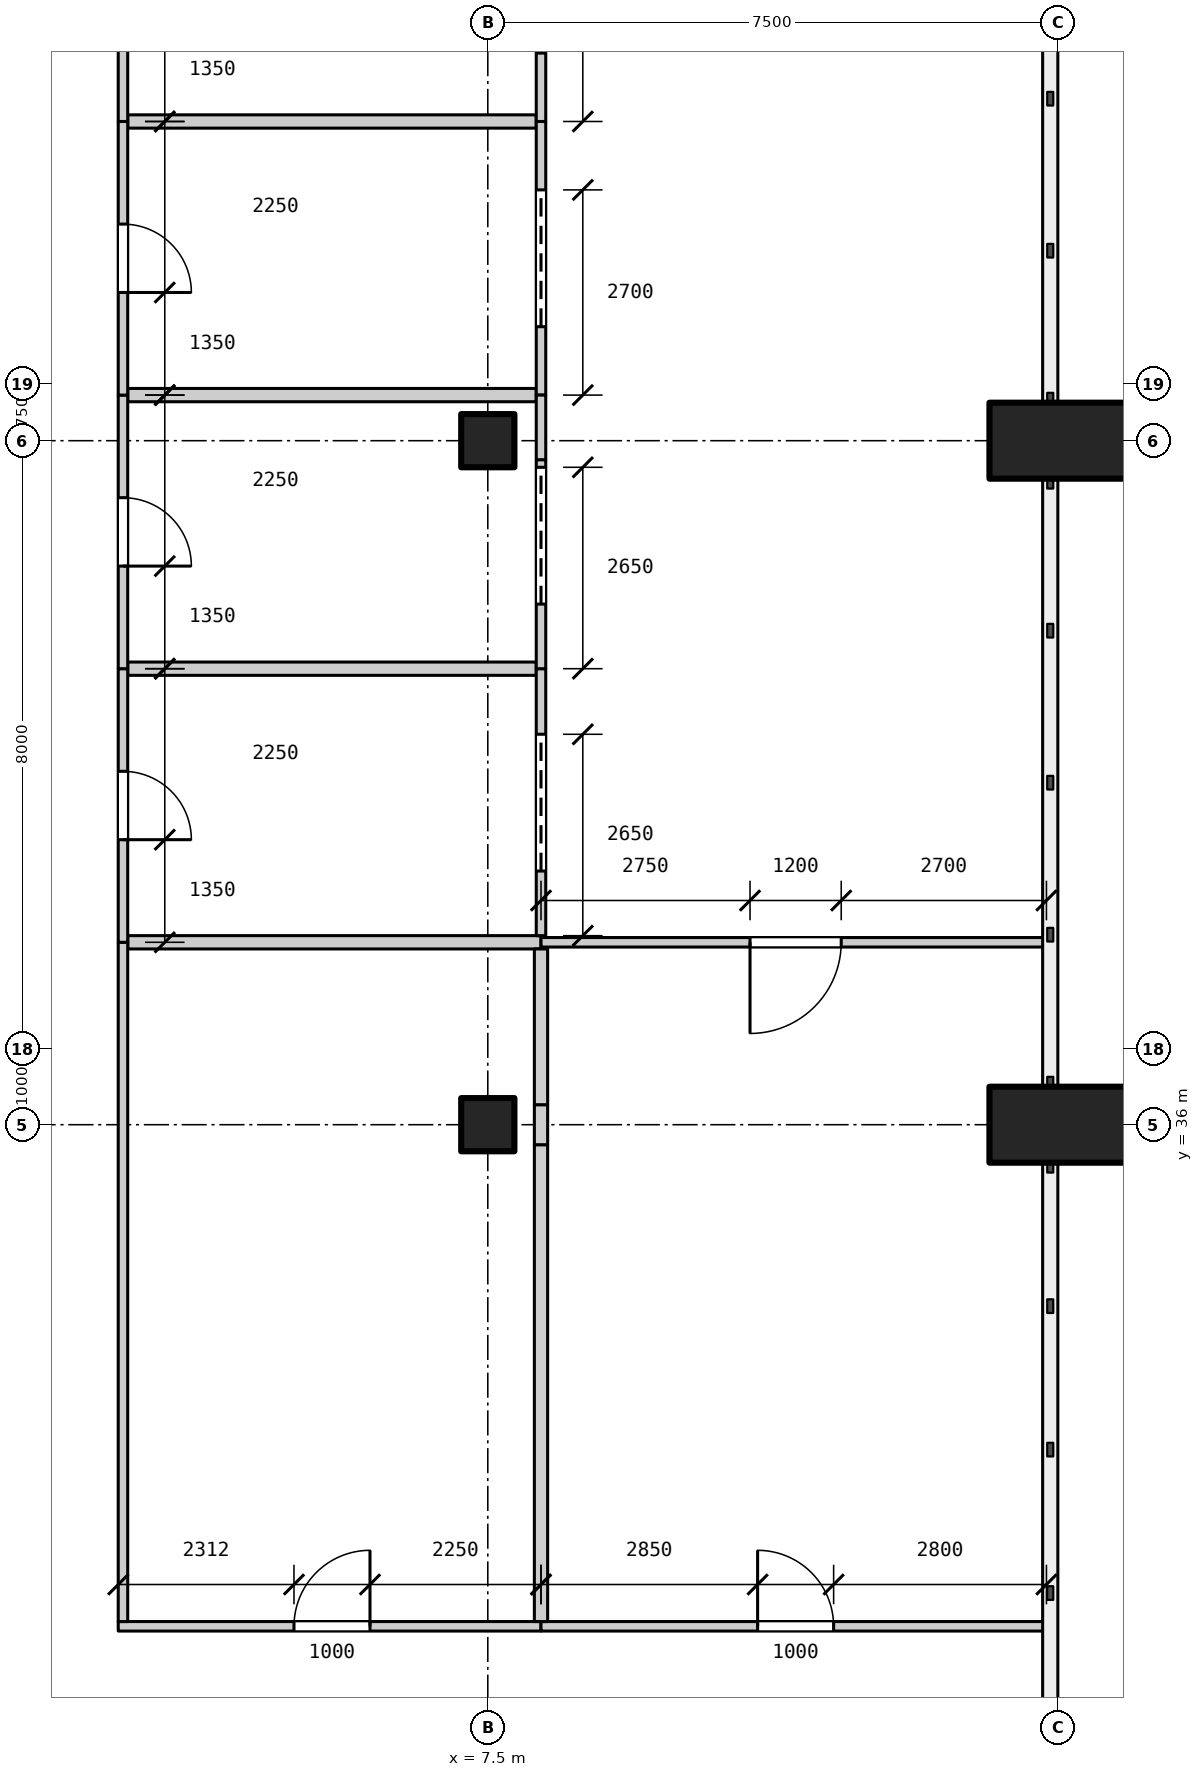
"""IFC4 building model, lengths in metres.
Left out: names, types, materials, properties, quantities, classifications, styles, units other than length and angle.
Written with IfcOpenShell. Run it as: python <this file> out.ifc"""

import sys

from ifc_helpers import new_model, si_unit, direction, frame, frame_2d, origin, origin_2d, place, context, subcontext, project, spatial, rectangle, extrude, element, fill, save


model = new_model("IFC4")
c1 = context("Model", 3, precision=1e-05, world=origin(), true_north=direction((0.0, 1.0)))
c2 = subcontext(c1, "Body", "Model", "MODEL_VIEW")
j1 = project(units=[si_unit("LENGTHUNIT", "METRE"), si_unit("PLANEANGLEUNIT", "RADIAN")], contexts=[c1])
p1 = place(None, origin())
s1 = spatial("IfcSite", under=j1, at=p1, CompositionType="ELEMENT")
p2 = place(p1, origin())
s2 = spatial("IfcBuilding", under=s1, at=p2, CompositionType="ELEMENT")
p3 = place(p2, frame((0.0, 0.0, 6.0)))
s3 = spatial("IfcBuildingStorey", under=s2, at=p3, CompositionType="ELEMENT", Elevation=6.0)
for number, where, z_axis, x_axis in (
    (1, (7.5, 36.0, 0.0), (0.0, 0.0, 1.0), (1.0, 0.0, 0.0)),
    (2, (7.5, 45.0, 0.0), (0.0, 0.0, 1.0), (1.0, 0.0, 0.0)),
):
    element("IfcColumn", number, at=place(p3, frame(where, z_axis=z_axis, x_axis=x_axis)), inside=s3, PredefinedType="COLUMN", context=c2, shape_type="SweptSolid", body=[
        extrude(rectangle(XDim=0.7, YDim=0.7, at=origin_2d()), origin(), (0.0, 0.0, 1.0), 3.9),
    ])
for number, where, z_axis, x_axis in (
    (3, (15.0, 36.0, 0.0), (0.0, 0.0, 1.0), (1.0, 0.0, 0.0)),
    (4, (15.0, 45.0, 0.0), (0.0, 0.0, 1.0), (1.0, 0.0, 0.0)),
):
    element("IfcColumn", number, at=place(p3, frame(where, z_axis=z_axis, x_axis=x_axis)), inside=s3, PredefinedType="COLUMN", context=c2, shape_type="SweptSolid", body=[
        extrude(rectangle(XDim=1.8, YDim=1.0, at=origin_2d()), origin(), (0.0, 0.0, 1.0), 4.2),
    ])
p4 = place(p3, frame((2.637, 29.4, 0.0), z_axis=(0.0, 0.0, 1.0), x_axis=(1.0, 0.0, 0.0)))
e5 = element("IfcWall", 5, at=p4, inside=s3, PredefinedType="PARTITIONING", context=c2, shape_type="SweptSolid", body=[
    extrude(rectangle(XDim=5.562, YDim=0.125, at=frame_2d((2.781, 0.0))), origin(), (0.0, 0.0, 1.0), 4.0),
])
p5 = place(p4, frame((2.312, 0.0, 0.0)))
e6 = element("IfcOpeningElement", 6, at=p5, cuts=e5, PredefinedType="OPENING", context=c2, shape_type="SweptSolid", body=[
    extrude(rectangle(XDim=1.0, YDim=2.1, at=frame_2d((0.5, 1.05))), frame((0.0, 0.073, 0.0), z_axis=(0.0, -1.0, 0.0), x_axis=(1.0, 0.0, 0.0)), (0.0, 0.0, 1.0), 0.145),
])
p6 = place(p3, frame((8.2, 29.4, 0.0), z_axis=(0.0, 0.0, 1.0), x_axis=(1.0, 0.0, 0.0)))
e7 = element("IfcWall", 7, at=p6, inside=s3, PredefinedType="PARTITIONING", context=c2, shape_type="SweptSolid", body=[
    extrude(rectangle(XDim=6.65, YDim=0.125, at=frame_2d((3.325, 0.0))), origin(), (0.0, 0.0, 1.0), 4.0),
])
p7 = place(p6, frame((2.85, 0.0, 0.0)))
e8 = element("IfcOpeningElement", 8, at=p7, cuts=e7, PredefinedType="OPENING", context=c2, shape_type="SweptSolid", body=[
    extrude(rectangle(XDim=1.0, YDim=2.1, at=frame_2d((0.5, 1.05))), frame((0.0, 0.073, 0.0), z_axis=(0.0, -1.0, 0.0), x_axis=(1.0, 0.0, 0.0)), (0.0, 0.0, 1.0), 0.145),
])
p8 = place(p3, frame((2.762, 38.4, 0.0), z_axis=(0.0, 0.0, 1.0), x_axis=(1.0, 0.0, 0.0)))
e9 = element("IfcWall", 9, at=p8, inside=s3, PredefinedType="PARTITIONING", context=c2, shape_type="SweptSolid", body=[
    extrude(rectangle(XDim=5.438, YDim=0.175, at=frame_2d((2.719, 0.0))), origin(), (0.0, 0.0, 1.0), 4.0),
])
p9 = place(p3, frame((8.2, 38.4, 0.0), z_axis=(0.0, 0.0, 1.0), x_axis=(1.0, 0.0, 0.0)))
e10 = element("IfcWall", 10, at=p9, inside=s3, PredefinedType="PARTITIONING", context=c2, shape_type="SweptSolid", body=[
    extrude(rectangle(XDim=6.65, YDim=0.125, at=frame_2d((3.325, 0.0))), origin(), (0.0, 0.0, 1.0), 4.0),
])
p10 = place(p9, frame((2.75, 0.0, 0.0)))
e11 = element("IfcOpeningElement", 11, at=p10, cuts=e10, PredefinedType="OPENING", context=c2, shape_type="SweptSolid", body=[
    extrude(rectangle(XDim=1.2, YDim=2.1, at=frame_2d((0.6, 1.05))), frame((0.0, 0.073, 0.0), z_axis=(0.0, -1.0, 0.0), x_axis=(1.0, 0.0, 0.0)), (0.0, 0.0, 1.0), 0.145),
])
for number, where, z_axis, x_axis in (
    (12, (2.762, 42.0, 0.0), (0.0, 0.0, 1.0), (1.0, 0.0, 0.0)),
    (13, (2.762, 45.6, 0.0), (0.0, 0.0, 1.0), (1.0, 0.0, 0.0)),
    (14, (2.762, 49.2, 0.0), (0.0, 0.0, 1.0), (1.0, 0.0, 0.0)),
):
    element("IfcWall", number, at=place(p3, frame(where, z_axis=z_axis, x_axis=x_axis)), inside=s3, PredefinedType="PARTITIONING", context=c2, shape_type="SweptSolid", body=[
        extrude(rectangle(XDim=5.375, YDim=0.175, at=frame_2d((2.688, 0.0))), origin(), (0.0, 0.0, 1.0), 4.0),
    ])
p11 = place(p3, frame((2.7, 29.462, 0.0), z_axis=(0.0, 0.0, 1.0), x_axis=(0.0, 1.0, 0.0)))
e15 = element("IfcWall", 15, at=p11, inside=s3, PredefinedType="PARTITIONING", context=c2, shape_type="SweptSolid", body=[
    extrude(rectangle(XDim=8.938, YDim=0.125, at=frame_2d((4.469, 0.0))), origin(), (0.0, 0.0, 1.0), 4.0),
])
p12 = place(p3, frame((2.7, 38.4, 0.0), z_axis=(0.0, 0.0, 1.0), x_axis=(0.0, 1.0, 0.0)))
e16 = element("IfcWall", 16, at=p12, inside=s3, PredefinedType="PARTITIONING", context=c2, shape_type="SweptSolid", body=[
    extrude(rectangle(XDim=3.6, YDim=0.125, at=frame_2d((1.8, 0.0))), origin(), (0.0, 0.0, 1.0), 4.0),
])
p13 = place(p12, frame((1.35, 0.0, 0.0)))
e17 = element("IfcOpeningElement", 17, at=p13, cuts=e16, PredefinedType="OPENING", context=c2, shape_type="SweptSolid", body=[
    extrude(rectangle(XDim=0.9, YDim=2.1, at=frame_2d((0.45, 1.05))), frame((0.0, 0.073, 0.0), z_axis=(0.0, -1.0, 0.0), x_axis=(1.0, 0.0, 0.0)), (0.0, 0.0, 1.0), 0.145),
])
p14 = place(p3, frame((2.7, 42.0, 0.0), z_axis=(0.0, 0.0, 1.0), x_axis=(0.0, 1.0, 0.0)))
e18 = element("IfcWall", 18, at=p14, inside=s3, PredefinedType="PARTITIONING", context=c2, shape_type="SweptSolid", body=[
    extrude(rectangle(XDim=3.6, YDim=0.125, at=frame_2d((1.8, 0.0))), origin(), (0.0, 0.0, 1.0), 4.0),
])
p15 = place(p14, frame((1.35, 0.0, 0.0)))
e19 = element("IfcOpeningElement", 19, at=p15, cuts=e18, PredefinedType="OPENING", context=c2, shape_type="SweptSolid", body=[
    extrude(rectangle(XDim=0.9, YDim=2.1, at=frame_2d((0.45, 1.05))), frame((0.0, 0.073, 0.0), z_axis=(0.0, -1.0, 0.0), x_axis=(1.0, 0.0, 0.0)), (0.0, 0.0, 1.0), 0.145),
])
p16 = place(p3, frame((2.7, 45.6, 0.0), z_axis=(0.0, 0.0, 1.0), x_axis=(0.0, 1.0, 0.0)))
e20 = element("IfcWall", 20, at=p16, inside=s3, PredefinedType="PARTITIONING", context=c2, shape_type="SweptSolid", body=[
    extrude(rectangle(XDim=3.6, YDim=0.125, at=frame_2d((1.8, 0.0))), origin(), (0.0, 0.0, 1.0), 4.0),
])
p17 = place(p16, frame((1.35, 0.0, 0.0)))
e21 = element("IfcOpeningElement", 21, at=p17, cuts=e20, PredefinedType="OPENING", context=c2, shape_type="SweptSolid", body=[
    extrude(rectangle(XDim=0.9, YDim=2.1, at=frame_2d((0.45, 1.05))), frame((0.0, 0.073, 0.0), z_axis=(0.0, -1.0, 0.0), x_axis=(1.0, 0.0, 0.0)), (0.0, 0.0, 1.0), 0.145),
])
p18 = place(p3, frame((2.7, 49.2, 0.0), z_axis=(0.0, 0.0, 1.0), x_axis=(0.0, 1.0, 0.0)))
e22 = element("IfcWall", 22, at=p18, inside=s3, PredefinedType="PARTITIONING", context=c2, shape_type="SweptSolid", body=[
    extrude(rectangle(XDim=3.6, YDim=0.125, at=frame_2d((1.8, 0.0))), origin(), (0.0, 0.0, 1.0), 4.0),
])
p19 = place(p18, frame((1.35, 0.0, 0.0)))
e23 = element("IfcOpeningElement", 23, at=p19, cuts=e22, PredefinedType="OPENING", context=c2, shape_type="SweptSolid", body=[
    extrude(rectangle(XDim=0.9, YDim=2.1, at=frame_2d((0.45, 1.05))), frame((0.0, 0.073, 0.0), z_axis=(0.0, -1.0, 0.0), x_axis=(1.0, 0.0, 0.0)), (0.0, 0.0, 1.0), 0.145),
])
p20 = place(p3, frame((8.2, 29.462, 0.0), z_axis=(0.0, 0.0, 1.0), x_axis=(0.0, 1.0, 0.0)))
e24 = element("IfcWall", 24, at=p20, inside=s3, PredefinedType="PARTITIONING", context=c2, shape_type="SweptSolid", body=[
    extrude(rectangle(XDim=6.274, YDim=0.175, at=frame_2d((3.137, 0.0))), origin(), (0.0, 0.0, 1.0), 3.567),
])
p21 = place(p3, frame((8.2, 38.488, 0.0), z_axis=(0.0, 0.0, 1.0), x_axis=(0.0, 1.0, 0.0)))
e25 = element("IfcWall", 25, at=p21, inside=s3, PredefinedType="PARTITIONING", context=c2, shape_type="SweptSolid", body=[
    extrude(rectangle(XDim=3.512, YDim=0.125, at=frame_2d((1.756, 0.0))), origin(), (0.0, 0.0, 1.0), 3.567),
])
p22 = place(p21, frame((0.85, 0.0, 0.0)))
e26 = element("IfcOpeningElement", 26, at=p22, cuts=e25, PredefinedType="OPENING", context=c2, shape_type="SweptSolid", body=[
    extrude(rectangle(XDim=1.8, YDim=2.4, at=frame_2d((0.9, 1.2))), frame((0.0, 0.073, 0.0), z_axis=(0.0, -1.0, 0.0), x_axis=(1.0, 0.0, 0.0)), (0.0, 0.0, 1.0), 0.145),
])
p23 = place(p3, frame((8.2, 42.0, 0.0), z_axis=(0.0, 0.0, 1.0), x_axis=(0.0, 1.0, 0.0)))
e27 = element("IfcWall", 27, at=p23, inside=s3, PredefinedType="PARTITIONING", context=c2, shape_type="SweptSolid", body=[
    extrude(rectangle(XDim=2.75, YDim=0.125, at=frame_2d((1.375, 0.0))), origin(), (0.0, 0.0, 1.0), 3.567),
])
p24 = place(p23, frame((0.85, 0.0, 0.0)))
e28 = element("IfcOpeningElement", 28, at=p24, cuts=e27, PredefinedType="OPENING", context=c2, shape_type="SweptSolid", body=[
    extrude(rectangle(XDim=1.8, YDim=2.4, at=frame_2d((0.9, 1.2))), frame((0.0, 0.073, 0.0), z_axis=(0.0, -1.0, 0.0), x_axis=(1.0, 0.0, 0.0)), (0.0, 0.0, 1.0), 0.145),
])
p25 = place(p3, frame((8.2, 45.6, 0.0), z_axis=(0.0, 0.0, 1.0), x_axis=(0.0, 1.0, 0.0)))
e29 = element("IfcWall", 29, at=p25, inside=s3, PredefinedType="PARTITIONING", context=c2, shape_type="SweptSolid", body=[
    extrude(rectangle(XDim=3.6, YDim=0.125, at=frame_2d((1.8, 0.0))), origin(), (0.0, 0.0, 1.0), 3.567),
])
p26 = place(p25, frame((0.9, 0.0, 0.0)))
e30 = element("IfcOpeningElement", 30, at=p26, cuts=e29, PredefinedType="OPENING", context=c2, shape_type="SweptSolid", body=[
    extrude(rectangle(XDim=1.8, YDim=2.4, at=frame_2d((0.9, 1.2))), frame((0.0, 0.073, 0.0), z_axis=(0.0, -1.0, 0.0), x_axis=(1.0, 0.0, 0.0)), (0.0, 0.0, 1.0), 0.145),
])
p27 = place(p3, frame((8.2, 49.2, 0.0), z_axis=(0.0, 0.0, 1.0), x_axis=(0.0, 1.0, 0.0)))
e31 = element("IfcWall", 31, at=p27, inside=s3, PredefinedType="PARTITIONING", context=c2, shape_type="SweptSolid", body=[
    extrude(rectangle(XDim=3.6, YDim=0.125, at=frame_2d((1.8, 0.0))), origin(), (0.0, 0.0, 1.0), 3.567),
])
p28 = place(p27, frame((0.9, 0.0, 0.0)))
e32 = element("IfcOpeningElement", 32, at=p28, cuts=e31, PredefinedType="OPENING", context=c2, shape_type="SweptSolid", body=[
    extrude(rectangle(XDim=1.8, YDim=2.4, at=frame_2d((0.9, 1.2))), frame((0.0, 0.073, 0.0), z_axis=(0.0, -1.0, 0.0), x_axis=(1.0, 0.0, 0.0)), (0.0, 0.0, 1.0), 0.145),
])
p29 = place(p3, frame((8.2, 35.737, 0.0), z_axis=(0.0, 0.0, 1.0), x_axis=(0.0, 1.0, 0.0)))
e33 = element("IfcWall", 33, at=p29, inside=s3, PredefinedType="PARTITIONING", context=c2, shape_type="SweptSolid", body=[
    extrude(rectangle(XDim=0.526, YDim=0.175, at=frame_2d((0.263, 0.0))), origin(), (0.0, 0.0, 1.0), 4.0),
])
p30 = place(p3, frame((8.2, 36.263, 0.0), z_axis=(0.0, 0.0, 1.0), x_axis=(0.0, 1.0, 0.0)))
e34 = element("IfcWall", 34, at=p30, inside=s3, PredefinedType="PARTITIONING", context=c2, shape_type="SweptSolid", body=[
    extrude(rectangle(XDim=2.049, YDim=0.175, at=frame_2d((1.025, 0.0))), origin(), (0.0, 0.0, 1.0), 3.567),
])
p31 = place(p3, frame((8.2, 44.75, 0.0), z_axis=(0.0, 0.0, 1.0), x_axis=(0.0, 1.0, 0.0)))
e35 = element("IfcWall", 35, at=p31, inside=s3, PredefinedType="PARTITIONING", context=c2, shape_type="SweptSolid", body=[
    extrude(rectangle(XDim=0.85, YDim=0.125, at=frame_2d((0.425, 0.0))), origin(), (0.0, 0.0, 1.0), 4.0),
])
p32 = place(p5, origin())
e36 = element("IfcDoor", 36, at=p32, inside=s3, OperationType="SINGLE_SWING_RIGHT", PredefinedType="DOOR", context=c2, shape_type="SweptSolid", body=[
    extrude(rectangle(XDim=1.0, YDim=2.1, at=frame_2d((0.5, 1.05))), frame((0.0, 0.025, 0.0), z_axis=(0.0, -1.0, 0.0), x_axis=(1.0, 0.0, 0.0)), (0.0, 0.0, 1.0), 0.05),
])
fill(e6, e36)
p33 = place(p7, origin())
e37 = element("IfcDoor", 37, at=p33, inside=s3, OperationType="SINGLE_SWING_LEFT", PredefinedType="DOOR", context=c2, shape_type="SweptSolid", body=[
    extrude(rectangle(XDim=1.0, YDim=2.1, at=frame_2d((0.5, 1.05))), frame((0.0, 0.025, 0.0), z_axis=(0.0, -1.0, 0.0), x_axis=(1.0, 0.0, 0.0)), (0.0, 0.0, 1.0), 0.05),
])
fill(e8, e37)
p34 = place(p10, frame((1.2, 0.0, 0.0), z_axis=(0.0, 0.0, 1.0), x_axis=(-1.0, 0.0, 0.0)))
e38 = element("IfcDoor", 38, at=p34, inside=s3, OperationType="SINGLE_SWING_RIGHT", PredefinedType="DOOR", context=c2, shape_type="SweptSolid", body=[
    extrude(rectangle(XDim=1.2, YDim=2.1, at=frame_2d((0.6, 1.05))), frame((0.0, 0.025, 0.0), z_axis=(0.0, -1.0, 0.0), x_axis=(1.0, 0.0, 0.0)), (0.0, 0.0, 1.0), 0.05),
])
fill(e11, e38)
p35 = place(p13, frame((0.9, 0.0, 0.0), z_axis=(0.0, 0.0, 1.0), x_axis=(-1.0, 0.0, 0.0)))
e39 = element("IfcDoor", 39, at=p35, inside=s3, OperationType="SINGLE_SWING_RIGHT", PredefinedType="DOOR", context=c2, shape_type="SweptSolid", body=[
    extrude(rectangle(XDim=0.9, YDim=2.1, at=frame_2d((0.45, 1.05))), frame((0.0, 0.025, 0.0), z_axis=(0.0, -1.0, 0.0), x_axis=(1.0, 0.0, 0.0)), (0.0, 0.0, 1.0), 0.05),
])
fill(e17, e39)
p36 = place(p22, origin())
e40 = element("IfcDoor", 40, at=p36, inside=s3, OperationType="ROLLINGUP", PredefinedType="DOOR", context=c2, shape_type="SweptSolid", body=[
    extrude(rectangle(XDim=1.8, YDim=2.4, at=frame_2d((0.9, 1.2))), frame((0.0, 0.025, 0.0), z_axis=(0.0, -1.0, 0.0), x_axis=(1.0, 0.0, 0.0)), (0.0, 0.0, 1.0), 0.05),
])
fill(e26, e40)
p37 = place(p15, frame((0.9, 0.0, 0.0), z_axis=(0.0, 0.0, 1.0), x_axis=(-1.0, 0.0, 0.0)))
e41 = element("IfcDoor", 41, at=p37, inside=s3, OperationType="SINGLE_SWING_RIGHT", PredefinedType="DOOR", context=c2, shape_type="SweptSolid", body=[
    extrude(rectangle(XDim=0.9, YDim=2.1, at=frame_2d((0.45, 1.05))), frame((0.0, 0.025, 0.0), z_axis=(0.0, -1.0, 0.0), x_axis=(1.0, 0.0, 0.0)), (0.0, 0.0, 1.0), 0.05),
])
fill(e19, e41)
p38 = place(p24, origin())
e42 = element("IfcDoor", 42, at=p38, inside=s3, OperationType="ROLLINGUP", PredefinedType="DOOR", context=c2, shape_type="SweptSolid", body=[
    extrude(rectangle(XDim=1.8, YDim=2.4, at=frame_2d((0.9, 1.2))), frame((0.0, 0.025, 0.0), z_axis=(0.0, -1.0, 0.0), x_axis=(1.0, 0.0, 0.0)), (0.0, 0.0, 1.0), 0.05),
])
fill(e28, e42)
p39 = place(p17, frame((0.9, 0.0, 0.0), z_axis=(0.0, 0.0, 1.0), x_axis=(-1.0, 0.0, 0.0)))
e43 = element("IfcDoor", 43, at=p39, inside=s3, OperationType="SINGLE_SWING_RIGHT", PredefinedType="DOOR", context=c2, shape_type="SweptSolid", body=[
    extrude(rectangle(XDim=0.9, YDim=2.1, at=frame_2d((0.45, 1.05))), frame((0.0, 0.025, 0.0), z_axis=(0.0, -1.0, 0.0), x_axis=(1.0, 0.0, 0.0)), (0.0, 0.0, 1.0), 0.05),
])
fill(e21, e43)
p40 = place(p26, origin())
e44 = element("IfcDoor", 44, at=p40, inside=s3, OperationType="ROLLINGUP", PredefinedType="DOOR", context=c2, shape_type="SweptSolid", body=[
    extrude(rectangle(XDim=1.8, YDim=2.4, at=frame_2d((0.9, 1.2))), frame((0.0, 0.025, 0.0), z_axis=(0.0, -1.0, 0.0), x_axis=(1.0, 0.0, 0.0)), (0.0, 0.0, 1.0), 0.05),
])
fill(e30, e44)
p41 = place(p28, origin())
e45 = element("IfcDoor", 45, at=p41, inside=s3, OperationType="ROLLINGUP", PredefinedType="DOOR", context=c2, shape_type="SweptSolid", body=[
    extrude(rectangle(XDim=1.8, YDim=2.4, at=frame_2d((0.9, 1.2))), frame((0.0, 0.025, 0.0), z_axis=(0.0, -1.0, 0.0), x_axis=(1.0, 0.0, 0.0)), (0.0, 0.0, 1.0), 0.05),
])
fill(e32, e45)
save(model, sys.argv[1])
